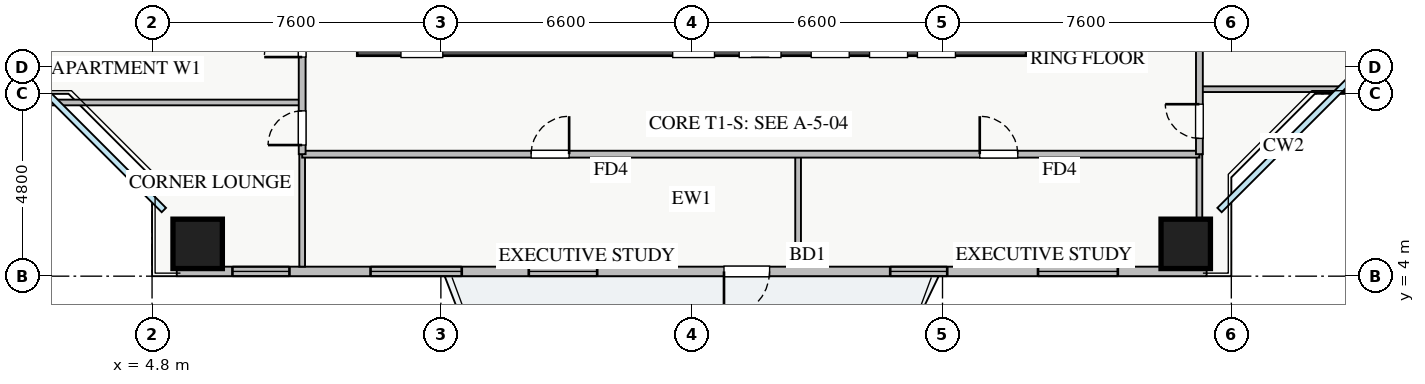
"""IFC4 building model, lengths in metres.
Left out: names, types, materials, properties, quantities, classifications, styles, units other than length and angle.
Written with IfcOpenShell. Run it as: python <this file> out.ifc"""

import sys

from ifc_helpers import new_model, si_unit, direction, frame, frame_2d, origin, origin_2d, place, context, subcontext, project, spatial, rectangle, extrude, source, transform, mapped, element, fill, save


model = new_model("IFC4")
c1 = context("Model", 3, precision=1e-05, world=origin(), true_north=direction((0.0, 1.0)))
c2 = subcontext(c1, "Body", "Model", "MODEL_VIEW")
j1 = project(units=[si_unit("LENGTHUNIT", "METRE"), si_unit("PLANEANGLEUNIT", "RADIAN")], contexts=[c1])
p1 = place(None, origin())
s1 = spatial("IfcSite", under=j1, at=p1, CompositionType="ELEMENT")
p2 = place(p1, origin())
s2 = spatial("IfcBuilding", under=s1, at=p2, CompositionType="ELEMENT")
p3 = place(p2, frame((0.0, 0.0, 66.5)))
s3 = spatial("IfcBuildingStorey", under=s2, at=p3, CompositionType="ELEMENT", Elevation=66.5)
p4 = place(p3, frame((10.2, 10.2, 0.0), z_axis=(0.0, 0.0, 1.0), x_axis=(1.0, 0.0, 0.0)))
e1 = element("IfcWall", 1, at=p4, inside=s3, PredefinedType="SHEAR", context=c2, shape_type="SweptSolid", body=[
    extrude(rectangle(XDim=17.6, YDim=0.8, at=frame_2d((8.8, 0.0))), origin(), (0.0, 0.0, 1.0), 3.25),
])
p5 = place(p4, frame((1.15, 0.0, 0.0)))
e2 = element("IfcOpeningElement", 2, at=p5, cuts=e1, PredefinedType="OPENING", context=c2, shape_type="SweptSolid", body=[
    extrude(rectangle(XDim=1.1, YDim=2.05, at=frame_2d((0.55, 1.025))), frame((0.0, 0.41, 0.0), z_axis=(0.0, -1.0, 0.0), x_axis=(1.0, 0.0, 0.0)), (0.0, 0.0, 1.0), 0.82),
])
p6 = place(p4, frame((8.3, 0.0, 0.0)))
e3 = element("IfcOpeningElement", 3, at=p6, cuts=e1, PredefinedType="OPENING", context=c2, shape_type="SweptSolid", body=[
    extrude(rectangle(XDim=1.1, YDim=2.05, at=frame_2d((0.55, 1.025))), frame((0.0, 0.41, 0.0), z_axis=(0.0, -1.0, 0.0), x_axis=(1.0, 0.0, 0.0)), (0.0, 0.0, 1.0), 0.82),
])
p7 = place(p4, frame((10.05, 0.0, 0.0)))
e4 = element("IfcOpeningElement", 4, at=p7, cuts=e1, PredefinedType="OPENING", context=c2, shape_type="SweptSolid", body=[
    extrude(rectangle(XDim=1.1, YDim=2.05, at=frame_2d((0.55, 1.025))), frame((0.0, 0.41, 0.0), z_axis=(0.0, -1.0, 0.0), x_axis=(1.0, 0.0, 0.0)), (0.0, 0.0, 1.0), 0.82),
])
p8 = place(p4, frame((14.74, 0.0, 0.0)))
e5 = element("IfcOpeningElement", 5, at=p8, cuts=e1, PredefinedType="OPENING", context=c2, shape_type="SweptSolid", body=[
    extrude(rectangle(XDim=1.0, YDim=2.05, at=frame_2d((0.5, 1.025))), frame((0.0, 0.41, 0.0), z_axis=(0.0, -1.0, 0.0), x_axis=(1.0, 0.0, 0.0)), (0.0, 0.0, 1.0), 0.82),
])
p9 = place(p4, frame((11.945, 0.0, 0.0)))
e6 = element("IfcOpeningElement", 6, at=p9, cuts=e1, PredefinedType="OPENING", context=c2, shape_type="SweptSolid", body=[
    extrude(rectangle(XDim=1.0, YDim=2.05, at=frame_2d((0.5, 1.025))), frame((0.0, 0.41, 0.0), z_axis=(0.0, -1.0, 0.0), x_axis=(1.0, 0.0, 0.0)), (0.0, 0.0, 1.0), 0.82),
])
p10 = place(p4, frame((13.48, 0.0, 0.0)))
e7 = element("IfcOpeningElement", 7, at=p10, cuts=e1, PredefinedType="OPENING", context=c2, shape_type="SweptSolid", body=[
    extrude(rectangle(XDim=1.0, YDim=2.05, at=frame_2d((0.5, 1.025))), frame((0.0, 0.41, 0.0), z_axis=(0.0, -1.0, 0.0), x_axis=(1.0, 0.0, 0.0)), (0.0, 0.0, 1.0), 0.82),
])
m1 = source(origin(), c2, "Body", "SweptSolid", [
    extrude(rectangle(XDim=1.3, YDim=1.3, at=origin_2d()), origin(), (0.0, 0.0, 1.0), 3.25),
])
for number, where, z_axis, x_axis in (
    (8, (6.0, 4.85, 0.0), (0.0, 0.0, 1.0), (1.0, 0.0, 0.0)),
    (9, (32.0, 4.85, 0.0), (0.0, 0.0, 1.0), (1.0, 0.0, 0.0)),
):
    element("IfcColumn", number, at=place(p3, frame(where, z_axis=z_axis, x_axis=x_axis)), inside=s3, PredefinedType="COLUMN", context=c2, shape_type="MappedRepresentation", body=[
        mapped(m1, transform((0.0, 0.0, 0.0), x_axis=(1.0, 0.0, 0.0), y_axis=(0.0, 1.0, 0.0), z_axis=(0.0, 0.0, 1.0), scale=1.0)),
    ])
p11 = place(p3, frame((5.45, 4.125, 0.0), z_axis=(0.0, 0.0, 1.0), x_axis=(1.0, 0.0, 0.0)))
e10 = element("IfcWall", 10, at=p11, inside=s3, PredefinedType="STANDARD", context=c2, shape_type="SweptSolid", body=[
    extrude(rectangle(XDim=27.1, YDim=0.25, at=frame_2d((13.55, 0.0))), origin(), (0.0, 0.0, 1.0), 2.61),
])
p12 = place(p11, frame((14.4, 0.0, 0.0)))
e11 = element("IfcOpeningElement", 11, at=p12, cuts=e10, PredefinedType="OPENING", context=c2, shape_type="SweptSolid", body=[
    extrude(rectangle(XDim=1.2, YDim=2.1, at=frame_2d((0.6, 1.05))), frame((0.0, 0.135, 0.0), z_axis=(0.0, -1.0, 0.0), x_axis=(1.0, 0.0, 0.0)), (0.0, 0.0, 1.0), 0.27),
])
p13 = place(p11, frame((1.465, 0.0, 0.9)))
e12 = element("IfcOpeningElement", 12, at=p13, cuts=e10, PredefinedType="OPENING", context=c2, shape_type="SweptSolid", body=[
    extrude(rectangle(XDim=1.5, YDim=1.5, at=frame_2d((0.75, 0.75))), frame((0.0, 0.135, 0.0), z_axis=(0.0, -1.0, 0.0), x_axis=(1.0, 0.0, 0.0)), (0.0, 0.0, 1.0), 0.27),
])
p14 = place(p11, frame((9.263, 0.0, 0.9)))
e13 = element("IfcOpeningElement", 13, at=p14, cuts=e10, PredefinedType="OPENING", context=c2, shape_type="SweptSolid", body=[
    extrude(rectangle(XDim=1.8, YDim=1.45, at=frame_2d((0.9, 0.725))), frame((0.0, 0.135, 0.0), z_axis=(0.0, -1.0, 0.0), x_axis=(1.0, 0.0, 0.0)), (0.0, 0.0, 1.0), 0.27),
])
p15 = place(p11, frame((18.774, 0.0, 0.9)))
e14 = element("IfcOpeningElement", 14, at=p15, cuts=e10, PredefinedType="OPENING", context=c2, shape_type="SweptSolid", body=[
    extrude(rectangle(XDim=1.5, YDim=1.5, at=frame_2d((0.75, 0.75))), frame((0.0, 0.135, 0.0), z_axis=(0.0, -1.0, 0.0), x_axis=(1.0, 0.0, 0.0)), (0.0, 0.0, 1.0), 0.27),
])
p16 = place(p11, frame((22.663, 0.0, 0.9)))
e15 = element("IfcOpeningElement", 15, at=p16, cuts=e10, PredefinedType="OPENING", context=c2, shape_type="SweptSolid", body=[
    extrude(rectangle(XDim=2.1, YDim=1.48, at=frame_2d((1.05, 0.74))), frame((0.0, 0.135, 0.0), z_axis=(0.0, -1.0, 0.0), x_axis=(1.0, 0.0, 0.0)), (0.0, 0.0, 1.0), 0.27),
])
p17 = place(p11, frame((5.099, 0.0, 0.9)))
e16 = element("IfcOpeningElement", 16, at=p17, cuts=e10, PredefinedType="OPENING", context=c2, shape_type="SweptSolid", body=[
    extrude(rectangle(XDim=2.4, YDim=1.5, at=frame_2d((1.2, 0.75))), frame((0.0, 0.135, 0.0), z_axis=(0.0, -1.0, 0.0), x_axis=(1.0, 0.0, 0.0)), (0.0, 0.0, 1.0), 0.27),
])
for number, where, z_axis, x_axis in (
    (17, (21.8, 4.25, 0.0), (0.0, 0.0, 1.0), (0.0, 1.0, 0.0)),
    (18, (8.75, 4.25, 0.0), (0.0, 0.0, 1.0), (0.0, 1.0, 0.0)),
    (19, (32.36, 4.25, 0.0), (0.0, 0.0, 1.0), (0.0, 1.0, 0.0)),
):
    element("IfcWall", number, at=place(p3, frame(where, z_axis=z_axis, x_axis=x_axis)), inside=s3, PredefinedType="PARTITIONING", context=c2, shape_type="SweptSolid", body=[
        extrude(rectangle(XDim=2.96, YDim=0.15, at=frame_2d((1.48, 0.0))), origin(), (0.0, 0.0, 1.0), 3.07),
    ])
p18 = place(p3, frame((8.75, 7.21, 0.0), z_axis=(0.0, 0.0, 1.0), x_axis=(1.0, 0.0, 0.0)))
e20 = element("IfcWall", 20, at=p18, inside=s3, PredefinedType="PARTITIONING", context=c2, shape_type="SweptSolid", body=[
    extrude(rectangle(XDim=23.61, YDim=0.18, at=frame_2d((11.805, 0.0))), origin(), (0.0, 0.0, 1.0), 3.07),
])
p19 = place(p18, frame((6.025, 0.0, 0.0)))
e21 = element("IfcOpeningElement", 21, at=p19, cuts=e20, PredefinedType="OPENING", context=c2, shape_type="SweptSolid", body=[
    extrude(rectangle(XDim=1.0, YDim=2.05, at=frame_2d((0.5, 1.025))), frame((0.0, 0.1, 0.0), z_axis=(0.0, -1.0, 0.0), x_axis=(1.0, 0.0, 0.0)), (0.0, 0.0, 1.0), 0.2),
])
p20 = place(p18, frame((17.83, 0.0, 0.0)))
e22 = element("IfcOpeningElement", 22, at=p20, cuts=e20, PredefinedType="OPENING", context=c2, shape_type="SweptSolid", body=[
    extrude(rectangle(XDim=1.0, YDim=2.05, at=frame_2d((0.5, 1.025))), frame((0.0, 0.1, 0.0), z_axis=(0.0, -1.0, 0.0), x_axis=(1.0, 0.0, 0.0)), (0.0, 0.0, 1.0), 0.2),
])
p21 = place(p3, frame((0.25, 8.57, 0.0), z_axis=(0.0, 0.0, 1.0), x_axis=(1.0, 0.0, 0.0)))
e23 = element("IfcWall", 23, at=p21, inside=s3, PredefinedType="PARTITIONING", context=c2, shape_type="SweptSolid", body=[
    extrude(rectangle(XDim=8.5, YDim=0.15, at=frame_2d((4.25, 0.0))), origin(), (0.0, 0.0, 1.0), 3.07),
])
p22 = place(p3, frame((8.75, 7.21, 0.0), z_axis=(0.0, 0.0, 1.0), x_axis=(0.0, 1.0, 0.0)))
e24 = element("IfcWall", 24, at=p22, inside=s3, PredefinedType="PARTITIONING", context=c2, shape_type="SweptSolid", body=[
    extrude(rectangle(XDim=31.23, YDim=0.18, at=frame_2d((15.615, 0.0))), origin(), (0.0, 0.0, 1.0), 3.07),
])
p23 = place(p22, frame((30.09, 0.0, 0.0)))
e25 = element("IfcOpeningElement", 25, at=p23, cuts=e24, PredefinedType="OPENING", context=c2, shape_type="SweptSolid", body=[
    extrude(rectangle(XDim=0.9, YDim=2.05, at=frame_2d((0.45, 1.025))), frame((0.0, 0.1, 0.0), z_axis=(0.0, -1.0, 0.0), x_axis=(1.0, 0.0, 0.0)), (0.0, 0.0, 1.0), 0.2),
])
p24 = place(p22, frame((0.24, 0.0, 0.0)))
e26 = element("IfcOpeningElement", 26, at=p24, cuts=e24, PredefinedType="OPENING", context=c2, shape_type="SweptSolid", body=[
    extrude(rectangle(XDim=0.9, YDim=2.05, at=frame_2d((0.45, 1.025))), frame((0.0, 0.1, 0.0), z_axis=(0.0, -1.0, 0.0), x_axis=(1.0, 0.0, 0.0)), (0.0, 0.0, 1.0), 0.2),
])
p25 = place(p22, frame((2.555, 0.0, 0.0)))
e27 = element("IfcOpeningElement", 27, at=p25, cuts=e24, PredefinedType="OPENING", context=c2, shape_type="SweptSolid", body=[
    extrude(rectangle(XDim=1.0, YDim=2.05, at=frame_2d((0.5, 1.025))), frame((0.0, 0.1, 0.0), z_axis=(0.0, -1.0, 0.0), x_axis=(1.0, 0.0, 0.0)), (0.0, 0.0, 1.0), 0.2),
])
p26 = place(p22, frame((11.91, 0.0, 0.0)))
e28 = element("IfcOpeningElement", 28, at=p26, cuts=e24, PredefinedType="OPENING", context=c2, shape_type="SweptSolid", body=[
    extrude(rectangle(XDim=1.0, YDim=2.05, at=frame_2d((0.5, 1.025))), frame((0.0, 0.1, 0.0), z_axis=(0.0, -1.0, 0.0), x_axis=(1.0, 0.0, 0.0)), (0.0, 0.0, 1.0), 0.2),
])
p27 = place(p22, frame((17.425, 0.0, 0.0)))
e29 = element("IfcOpeningElement", 29, at=p27, cuts=e24, PredefinedType="OPENING", context=c2, shape_type="SweptSolid", body=[
    extrude(rectangle(XDim=1.0, YDim=2.05, at=frame_2d((0.5, 1.025))), frame((0.0, 0.1, 0.0), z_axis=(0.0, -1.0, 0.0), x_axis=(1.0, 0.0, 0.0)), (0.0, 0.0, 1.0), 0.2),
])
p28 = place(p22, frame((23.76, 0.0, 0.0)))
e30 = element("IfcOpeningElement", 30, at=p28, cuts=e24, PredefinedType="OPENING", context=c2, shape_type="SweptSolid", body=[
    extrude(rectangle(XDim=1.0, YDim=2.05, at=frame_2d((0.5, 1.025))), frame((0.0, 0.1, 0.0), z_axis=(0.0, -1.0, 0.0), x_axis=(1.0, 0.0, 0.0)), (0.0, 0.0, 1.0), 0.2),
])
p29 = place(p3, frame((32.36, 8.92, 0.0), z_axis=(0.0, 0.0, 1.0), x_axis=(1.0, 0.0, 0.0)))
e31 = element("IfcWall", 31, at=p29, inside=s3, PredefinedType="PARTITIONING", context=c2, shape_type="SweptSolid", body=[
    extrude(rectangle(XDim=5.39, YDim=0.15, at=frame_2d((2.695, 0.0))), origin(), (0.0, 0.0, 1.0), 3.07),
])
p30 = place(p3, frame((32.36, 7.21, 0.0), z_axis=(0.0, 0.0, 1.0), x_axis=(0.0, 1.0, 0.0)))
e32 = element("IfcWall", 32, at=p30, inside=s3, PredefinedType="PARTITIONING", context=c2, shape_type="SweptSolid", body=[
    extrude(rectangle(XDim=31.23, YDim=0.18, at=frame_2d((15.615, 0.0))), origin(), (0.0, 0.0, 1.0), 2.715),
])
p31 = place(p30, frame((30.09, 0.0, 0.0)))
e33 = element("IfcOpeningElement", 33, at=p31, cuts=e32, PredefinedType="OPENING", context=c2, shape_type="SweptSolid", body=[
    extrude(rectangle(XDim=0.9, YDim=2.05, at=frame_2d((0.45, 1.025))), frame((0.0, 0.1, 0.0), z_axis=(0.0, -1.0, 0.0), x_axis=(1.0, 0.0, 0.0)), (0.0, 0.0, 1.0), 0.2),
])
p32 = place(p30, frame((0.415, 0.0, 0.0)))
e34 = element("IfcOpeningElement", 34, at=p32, cuts=e32, PredefinedType="OPENING", context=c2, shape_type="SweptSolid", body=[
    extrude(rectangle(XDim=0.9, YDim=2.05, at=frame_2d((0.45, 1.025))), frame((0.0, 0.1, 0.0), z_axis=(0.0, -1.0, 0.0), x_axis=(1.0, 0.0, 0.0)), (0.0, 0.0, 1.0), 0.2),
])
p33 = place(p30, frame((7.975, 0.0, 0.0)))
e35 = element("IfcOpeningElement", 35, at=p33, cuts=e32, PredefinedType="OPENING", context=c2, shape_type="SweptSolid", body=[
    extrude(rectangle(XDim=1.0, YDim=2.05, at=frame_2d((0.5, 1.025))), frame((0.0, 0.1, 0.0), z_axis=(0.0, -1.0, 0.0), x_axis=(1.0, 0.0, 0.0)), (0.0, 0.0, 1.0), 0.2),
])
p34 = place(p30, frame((18.5, 0.0, 0.0)))
e36 = element("IfcOpeningElement", 36, at=p34, cuts=e32, PredefinedType="OPENING", context=c2, shape_type="SweptSolid", body=[
    extrude(rectangle(XDim=1.0, YDim=2.05, at=frame_2d((0.5, 1.025))), frame((0.0, 0.1, 0.0), z_axis=(0.0, -1.0, 0.0), x_axis=(1.0, 0.0, 0.0)), (0.0, 0.0, 1.0), 0.2),
])
m2 = source(origin(), c2, "Body", "SweptSolid", [
    extrude(rectangle(XDim=1.2, YDim=2.1, at=frame_2d((0.6, 1.05))), frame((0.0, 0.025, 0.0), z_axis=(0.0, -1.0, 0.0), x_axis=(1.0, 0.0, 0.0)), (0.0, 0.0, 1.0), 0.05),
])
p35 = place(p12, frame((1.2, 0.0, 0.0), z_axis=(0.0, 0.0, 1.0), x_axis=(-1.0, 0.0, 0.0)))
e37 = element("IfcDoor", 37, at=p35, inside=s3, OperationType="SINGLE_SWING_LEFT", PredefinedType="DOOR", context=c2, shape_type="MappedRepresentation", body=[
    mapped(m2, transform((0.0, 0.0, 0.0), x_axis=(1.0, 0.0, 0.0), y_axis=(0.0, 1.0, 0.0), z_axis=(0.0, 0.0, 1.0), scale=1.0)),
])
fill(e11, e37)
m3 = source(origin(), c2, "Body", "SweptSolid", [
    extrude(rectangle(XDim=1.5, YDim=1.5, at=frame_2d((0.75, 0.75))), frame((0.0, 0.03, 0.0), z_axis=(0.0, -1.0, 0.0), x_axis=(1.0, 0.0, 0.0)), (0.0, 0.0, 1.0), 0.06),
])
p36 = place(p13, origin())
e38 = element("IfcWindow", 38, at=p36, inside=s3, PartitioningType="TRIPLE_PANEL_VERTICAL", PredefinedType="WINDOW", context=c2, shape_type="MappedRepresentation", body=[
    mapped(m3, transform((0.0, 0.0, 0.0), x_axis=(1.0, 0.0, 0.0), y_axis=(0.0, 1.0, 0.0), z_axis=(0.0, 0.0, 1.0), scale=1.0)),
])
fill(e12, e38)
m4 = source(origin(), c2, "Body", "SweptSolid", [
    extrude(rectangle(XDim=1.8, YDim=1.45, at=frame_2d((0.9, 0.725))), frame((0.0, 0.03, 0.0), z_axis=(0.0, -1.0, 0.0), x_axis=(1.0, 0.0, 0.0)), (0.0, 0.0, 1.0), 0.06),
])
p37 = place(p14, origin())
e39 = element("IfcWindow", 39, at=p37, inside=s3, PartitioningType="DOUBLE_PANEL_VERTICAL", PredefinedType="WINDOW", context=c2, shape_type="MappedRepresentation", body=[
    mapped(m4, transform((0.0, 0.0, 0.0), x_axis=(1.0, 0.0, 0.0), y_axis=(0.0, 1.0, 0.0), z_axis=(0.0, 0.0, 1.0), scale=1.0)),
])
fill(e13, e39)
p38 = place(p15, origin())
e40 = element("IfcWindow", 40, at=p38, inside=s3, PartitioningType="DOUBLE_PANEL_VERTICAL", PredefinedType="WINDOW", context=c2, shape_type="MappedRepresentation", body=[
    mapped(m3, transform((0.0, 0.0, 0.0), x_axis=(1.0, 0.0, 0.0), y_axis=(0.0, 1.0, 0.0), z_axis=(0.0, 0.0, 1.0), scale=1.0)),
])
fill(e14, e40)
m5 = source(origin(), c2, "Body", "SweptSolid", [
    extrude(rectangle(XDim=2.1, YDim=1.48, at=frame_2d((1.05, 0.74))), frame((0.0, 0.03, 0.0), z_axis=(0.0, -1.0, 0.0), x_axis=(1.0, 0.0, 0.0)), (0.0, 0.0, 1.0), 0.06),
])
p39 = place(p16, origin())
e41 = element("IfcWindow", 41, at=p39, inside=s3, PartitioningType="TRIPLE_PANEL_VERTICAL", PredefinedType="WINDOW", context=c2, shape_type="MappedRepresentation", body=[
    mapped(m5, transform((0.0, 0.0, 0.0), x_axis=(1.0, 0.0, 0.0), y_axis=(0.0, 1.0, 0.0), z_axis=(0.0, 0.0, 1.0), scale=1.0)),
])
fill(e15, e41)
m6 = source(origin(), c2, "Body", "SweptSolid", [
    extrude(rectangle(XDim=1.0, YDim=2.05, at=frame_2d((0.5, 1.025))), frame((0.0, 0.025, 0.0), z_axis=(0.0, -1.0, 0.0), x_axis=(1.0, 0.0, 0.0)), (0.0, 0.0, 1.0), 0.05),
])
p40 = place(p19, origin())
e42 = element("IfcDoor", 42, at=p40, inside=s3, OperationType="SINGLE_SWING_RIGHT", PredefinedType="DOOR", context=c2, shape_type="MappedRepresentation", body=[
    mapped(m6, transform((0.0, 0.0, 0.0), x_axis=(1.0, 0.0, 0.0), y_axis=(0.0, 1.0, 0.0), z_axis=(0.0, 0.0, 1.0), scale=1.0)),
])
fill(e21, e42)
p41 = place(p20, origin())
e43 = element("IfcDoor", 43, at=p41, inside=s3, OperationType="SINGLE_SWING_LEFT", PredefinedType="DOOR", context=c2, shape_type="MappedRepresentation", body=[
    mapped(m6, transform((0.0, 0.0, 0.0), x_axis=(1.0, 0.0, 0.0), y_axis=(0.0, 1.0, 0.0), z_axis=(0.0, 0.0, 1.0), scale=1.0)),
])
fill(e22, e43)
m7 = source(origin(), c2, "Body", "SweptSolid", [
    extrude(rectangle(XDim=0.9, YDim=2.05, at=frame_2d((0.45, 1.025))), frame((0.0, 0.025, 0.0), z_axis=(0.0, -1.0, 0.0), x_axis=(1.0, 0.0, 0.0)), (0.0, 0.0, 1.0), 0.05),
])
p42 = place(p24, origin())
e44 = element("IfcDoor", 44, at=p42, inside=s3, OperationType="SINGLE_SWING_LEFT", PredefinedType="DOOR", context=c2, shape_type="MappedRepresentation", body=[
    mapped(m7, transform((0.0, 0.0, 0.0), x_axis=(1.0, 0.0, 0.0), y_axis=(0.0, 1.0, 0.0), z_axis=(0.0, 0.0, 1.0), scale=1.0)),
])
fill(e26, e44)
p43 = place(p25, origin())
e45 = element("IfcDoor", 45, at=p43, inside=s3, OperationType="SINGLE_SWING_LEFT", PredefinedType="DOOR", context=c2, shape_type="MappedRepresentation", body=[
    mapped(m6, transform((0.0, 0.0, 0.0), x_axis=(1.0, 0.0, 0.0), y_axis=(0.0, 1.0, 0.0), z_axis=(0.0, 0.0, 1.0), scale=1.0)),
])
fill(e27, e45)
p44 = place(p32, origin())
e46 = element("IfcDoor", 46, at=p44, inside=s3, OperationType="SINGLE_SWING_RIGHT", PredefinedType="DOOR", context=c2, shape_type="MappedRepresentation", body=[
    mapped(m7, transform((0.0, 0.0, 0.0), x_axis=(1.0, 0.0, 0.0), y_axis=(0.0, 1.0, 0.0), z_axis=(0.0, 0.0, 1.0), scale=1.0)),
])
fill(e34, e46)
m8 = source(origin(), c2, "Body", "SweptSolid", [
    extrude(rectangle(XDim=2.4, YDim=1.5, at=frame_2d((1.2, 0.75))), frame((0.0, 0.03, 0.0), z_axis=(0.0, -1.0, 0.0), x_axis=(1.0, 0.0, 0.0)), (0.0, 0.0, 1.0), 0.06),
])
p45 = place(p17, origin())
e47 = element("IfcWindow", 47, at=p45, inside=s3, PartitioningType="TRIPLE_PANEL_VERTICAL", PredefinedType="WINDOW", context=c2, shape_type="MappedRepresentation", body=[
    mapped(m8, transform((0.0, 0.0, 0.0), x_axis=(1.0, 0.0, 0.0), y_axis=(0.0, 1.0, 0.0), z_axis=(0.0, 0.0, 1.0), scale=1.0)),
])
fill(e16, e47)
save(model, sys.argv[1])
